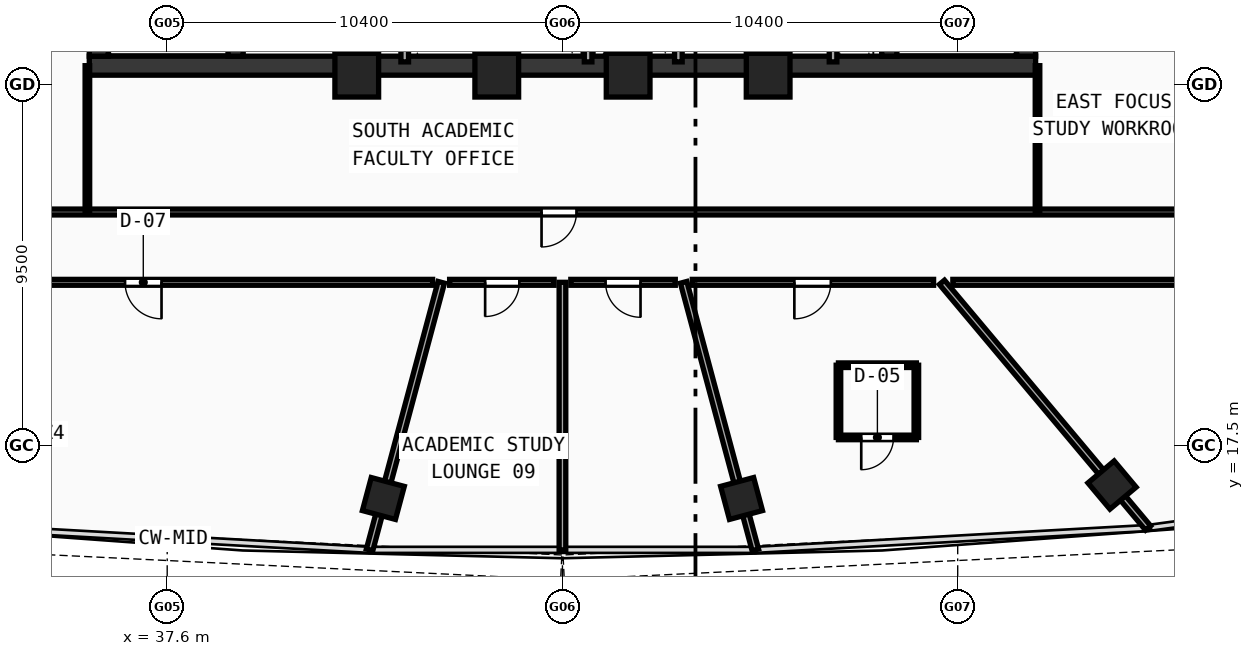
"""IFC4 building model, lengths in metres.
Left out: names, types, materials, properties, quantities, classifications, styles, units other than length and angle.
Written with IfcOpenShell. Run it as: python <this file> out.ifc"""

import sys

from ifc_helpers import new_model, si_unit, direction, frame, frame_2d, origin, origin_with_axes, origin_2d, place, context, subcontext, project, spatial, rectangle, hollow_rectangle, extrude, source, transform, mapped, element, fill, save


model = new_model("IFC4")
c1 = context("Model", 3, precision=1e-05, world=origin(), true_north=direction((0.0, 1.0)))
c2 = subcontext(c1, "Body", "Model", "MODEL_VIEW")
j1 = project(units=[si_unit("LENGTHUNIT", "METRE"), si_unit("PLANEANGLEUNIT", "RADIAN")], contexts=[c1])
p1 = place(None, origin())
s1 = spatial("IfcSite", under=j1, at=p1, CompositionType="ELEMENT")
p2 = place(p1, origin())
s2 = spatial("IfcBuilding", under=s1, at=p2, CompositionType="ELEMENT")
p3 = place(p2, frame((0.0, 0.0, 211.36)))
s3 = spatial("IfcBuildingStorey", under=s2, at=p3, CompositionType="ELEMENT", Elevation=211.36)
p4 = place(p3, frame((35.55, 27.5, 0.0), z_axis=(0.0, 0.0, 1.0), x_axis=(1.0, 0.0, 0.0)))
e1 = element("IfcWall", 1, at=p4, inside=s3, PredefinedType="SHEAR", context=c2, shape_type="SweptSolid", body=[
    extrude(rectangle(XDim=24.9, YDim=0.5, at=frame_2d((12.45, 0.0))), origin(), (0.0, 0.0, 1.0), 3.54),
])
for number, where, z_axis, x_axis in (
    (2, (35.8, 27.75, 0.0), (0.0, 0.0, 1.0), (0.0, 1.0, 0.0)),
    (3, (60.2, 27.75, 0.0), (0.0, 0.0, 1.0), (0.0, 1.0, 0.0)),
):
    element("IfcWall", number, at=place(p3, frame(where, z_axis=z_axis, x_axis=x_axis)), inside=s3, PredefinedType="SHEAR", context=c2, shape_type="SweptSolid", body=[
        extrude(rectangle(XDim=12.2, YDim=0.5, at=frame_2d((6.1, 0.0))), origin(), (0.0, 0.0, 1.0), 3.54),
    ])
p5 = place(p3, frame((39.4, 27.75, 0.0), z_axis=(0.0, 0.0, 1.0), x_axis=(0.0, 1.0, 0.0)))
e4 = element("IfcWall", 4, at=p5, inside=s3, PredefinedType="SHEAR", context=c2, shape_type="SweptSolid", body=[
    extrude(rectangle(XDim=12.2, YDim=0.4, at=frame_2d((6.1, 0.0))), origin(), (0.0, 0.0, 1.0), 3.54),
])
p6 = place(p5, frame((10.0, 0.0, 0.0)))
e5 = element("IfcOpeningElement", 5, at=p6, cuts=e4, PredefinedType="OPENING", context=c2, shape_type="SweptSolid", body=[
    extrude(rectangle(XDim=1.1, YDim=2.1, at=frame_2d((0.55, 1.05))), frame((0.0, 0.21, 0.0), z_axis=(0.0, -1.0, 0.0), x_axis=(1.0, 0.0, 0.0)), (0.0, 0.0, 1.0), 0.42),
])
p7 = place(p3, frame((56.6, 27.75, 0.0), z_axis=(0.0, 0.0, 1.0), x_axis=(0.0, 1.0, 0.0)))
e6 = element("IfcWall", 6, at=p7, inside=s3, PredefinedType="SHEAR", context=c2, shape_type="SweptSolid", body=[
    extrude(rectangle(XDim=12.2, YDim=0.4, at=frame_2d((6.1, 0.0))), origin(), (0.0, 0.0, 1.0), 3.54),
])
p8 = place(p7, frame((10.0, 0.0, 0.0)))
e7 = element("IfcOpeningElement", 7, at=p8, cuts=e6, PredefinedType="OPENING", context=c2, shape_type="SweptSolid", body=[
    extrude(rectangle(XDim=1.1, YDim=2.1, at=frame_2d((0.55, 1.05))), frame((0.0, 0.21, 0.0), z_axis=(0.0, -1.0, 0.0), x_axis=(1.0, 0.0, 0.0)), (0.0, 0.0, 1.0), 0.42),
])
m1 = source(origin(), c2, "Body", "SweptSolid", [
    extrude(hollow_rectangle(XDim=1.15, YDim=1.15, WallThickness=0.048, at=origin_2d()), origin(), (0.0, 0.0, 1.0), 3.8),
])
for number, where, z_axis, x_axis in (
    (8, (42.588, 27.25, -0.26), (0.0, 0.0, 1.0), (1.0, 0.0, 0.0)),
    (9, (46.272, 27.25, -0.26), (0.0, 0.0, 1.0), (1.0, 0.0, 0.0)),
    (10, (49.729, 27.25, -0.26), (0.0, 0.0, 1.0), (1.0, 0.0, 0.0)),
    (11, (53.412, 27.25, -0.26), (0.0, 0.0, 1.0), (1.0, 0.0, 0.0)),
):
    element("IfcColumn", number, at=place(p3, frame(where, z_axis=z_axis, x_axis=x_axis)), inside=s3, PredefinedType="COLUMN", context=c2, shape_type="MappedRepresentation", body=[
        mapped(m1, transform((0.0, 0.0, 0.0), scale=1.0)),
    ])
m2 = source(origin(), c2, "Body", "SweptSolid", [
    extrude(hollow_rectangle(XDim=0.9, YDim=0.9, WallThickness=0.036, at=origin_2d()), origin(), (0.0, 0.0, 1.0), 3.8),
])
for number, where, z_axis, x_axis in (
    (12, (43.288, 16.112, -0.26), (0.0, 0.0, 1.0), (0.966, -0.259, 0.0)),
    (13, (52.713, 16.112, -0.26), (0.0, 0.0, 1.0), (0.966, 0.259, 0.0)),
    (14, (62.461, 16.466, -0.26), (0.0, 0.0, 1.0), (0.766, 0.643, 0.0)),
):
    element("IfcColumn", number, at=place(p3, frame(where, z_axis=z_axis, x_axis=x_axis)), inside=s3, PredefinedType="COLUMN", context=c2, shape_type="MappedRepresentation", body=[
        mapped(m2, transform((0.0, 0.0, 0.0), scale=1.0)),
    ])
p9 = place(p3, frame((43.85, 27.6, 0.0), z_axis=(0.0, 0.0, 1.0), x_axis=(0.0, 1.0, 0.0)))
e15 = element("IfcWall", 15, at=p9, inside=s3, PredefinedType="SOLIDWALL", context=c2, shape_type="SweptSolid", body=[
    extrude(rectangle(XDim=6.22, YDim=0.2, at=frame_2d((3.11, 0.0))), origin(), (0.0, 0.0, 1.0), 3.54),
])
p10 = place(p9, frame((2.25, 0.0, 0.0)))
e16 = element("IfcOpeningElement", 16, at=p10, cuts=e15, PredefinedType="OPENING", context=c2, shape_type="SweptSolid", body=[
    extrude(rectangle(XDim=1.05, YDim=2.1, at=frame_2d((0.525, 1.05))), frame((0.0, 0.11, 0.0), z_axis=(0.0, -1.0, 0.0), x_axis=(1.0, 0.0, 0.0)), (0.0, 0.0, 1.0), 0.22),
])
p11 = place(p3, frame((53.68, 27.6, 0.0), z_axis=(0.0, 0.0, 1.0), x_axis=(0.0, 1.0, 0.0)))
e17 = element("IfcWall", 17, at=p11, inside=s3, PredefinedType="SOLIDWALL", context=c2, shape_type="SweptSolid", body=[
    extrude(rectangle(XDim=9.05, YDim=0.2, at=frame_2d((4.525, 0.0))), origin(), (0.0, 0.0, 1.0), 3.54),
])
p12 = place(p11, frame((6.9, 0.0, 0.0)))
e18 = element("IfcOpeningElement", 18, at=p12, cuts=e17, PredefinedType="OPENING", context=c2, shape_type="SweptSolid", body=[
    extrude(rectangle(XDim=1.05, YDim=2.1, at=frame_2d((0.525, 1.05))), frame((0.0, 0.11, 0.0), z_axis=(0.0, -1.0, 0.0), x_axis=(1.0, 0.0, 0.0)), (0.0, 0.0, 1.0), 0.22),
])
for number, where, z_axis, x_axis in (
    (19, (51.05, 27.6, 0.0), (0.0, 0.0, 1.0), (0.0, 1.0, 0.0)),
    (20, (46.225, 27.6, 0.0), (0.0, 0.0, 1.0), (0.0, 1.0, 0.0)),
    (21, (48.675, 27.6, 0.0), (0.0, 0.0, 1.0), (0.0, 1.0, 0.0)),
    (22, (55.12, 27.6, 0.0), (0.0, 0.0, 1.0), (0.0, 1.0, 0.0)),
):
    element("IfcWall", number, at=place(p3, frame(where, z_axis=z_axis, x_axis=x_axis)), inside=s3, PredefinedType="SOLIDWALL", context=c2, shape_type="SweptSolid", body=[
        extrude(rectangle(XDim=2.12, YDim=0.2, at=frame_2d((1.06, 0.0))), origin(), (0.0, 0.0, 1.0), 3.54),
    ])
p13 = place(p3, frame((42.32, 27.6, 0.0), z_axis=(0.0, 0.0, 1.0), x_axis=(0.0, 1.0, 0.0)))
e23 = element("IfcWall", 23, at=p13, inside=s3, PredefinedType="PARTITIONING", context=c2, shape_type="SweptSolid", body=[
    extrude(rectangle(XDim=5.9, YDim=0.155, at=frame_2d((2.95, 0.0))), origin(), (0.0, 0.0, 1.0), 3.54),
])
p14 = place(p13, frame((3.2, 0.0, 0.0)))
e24 = element("IfcOpeningElement", 24, at=p14, cuts=e23, PredefinedType="OPENING", context=c2, shape_type="SweptSolid", body=[
    extrude(rectangle(XDim=0.94, YDim=2.1, at=frame_2d((0.47, 1.05))), frame((0.0, 0.087, 0.0), z_axis=(0.0, -1.0, 0.0), x_axis=(1.0, 0.0, 0.0)), (0.0, 0.0, 1.0), 0.175),
])
p15 = place(p3, frame((31.45, 23.65, 0.0), z_axis=(0.0, 0.0, 1.0), x_axis=(1.0, 0.0, 0.0)))
e25 = element("IfcWall", 25, at=p15, inside=s3, PredefinedType="PARTITIONING", context=c2, shape_type="SweptSolid", body=[
    extrude(rectangle(XDim=33.1, YDim=0.155, at=frame_2d((16.55, 0.0))), origin(), (0.0, 0.0, 1.0), 2.89),
])
p16 = place(p15, frame((16.0, 0.0, 0.0)))
e26 = element("IfcOpeningElement", 26, at=p16, cuts=e25, PredefinedType="OPENING", context=c2, shape_type="SweptSolid", body=[
    extrude(rectangle(XDim=0.92, YDim=2.1, at=frame_2d((0.46, 1.05))), frame((0.0, 0.087, 0.0), z_axis=(0.0, -1.0, 0.0), x_axis=(1.0, 0.0, 0.0)), (0.0, 0.0, 1.0), 0.175),
])
for number, where, z_axis, x_axis in (
    (27, (35.5, 23.65, 0.0), (0.0, 0.0, 1.0), (0.0, 1.0, 0.0)),
    (28, (60.5, 23.65, 0.0), (0.0, 0.0, 1.0), (0.0, 1.0, 0.0)),
):
    element("IfcWall", number, at=place(p3, frame(where, z_axis=z_axis, x_axis=x_axis)), inside=s3, PredefinedType="PARTITIONING", context=c2, shape_type="SweptSolid", body=[
        extrude(rectangle(XDim=3.85, YDim=0.12, at=frame_2d((1.925, 0.0))), origin(), (0.0, 0.0, 1.0), 3.14),
    ])
p17 = place(p3, frame((44.811, 21.8, 0.0), z_axis=(0.0, 0.0, 1.0), x_axis=(-0.258817575638, -0.96592622003, 0.0)))
e29 = element("IfcWall", 29, at=p17, inside=s3, PredefinedType="PARTITIONING", context=c2, shape_type="SweptSolid", body=[
    extrude(rectangle(XDim=7.288, YDim=0.175, at=frame_2d((3.644, 0.0))), origin(), (0.0, 0.0, 1.0), 2.89),
])
p18 = place(p3, frame((48.0, 21.8, 0.0), z_axis=(0.0, 0.0, 1.0), x_axis=(0.0, -1.0, 0.0)))
e30 = element("IfcWall", 30, at=p18, inside=s3, PredefinedType="PARTITIONING", context=c2, shape_type="SweptSolid", body=[
    extrude(rectangle(XDim=7.04, YDim=0.175, at=frame_2d((3.52, 0.0))), origin(), (0.0, 0.0, 1.0), 2.89),
])
p19 = place(p3, frame((51.189, 21.8, 0.0), z_axis=(0.0, 0.0, 1.0), x_axis=(0.258817575638, -0.96592622003, 0.0)))
e31 = element("IfcWall", 31, at=p19, inside=s3, PredefinedType="PARTITIONING", context=c2, shape_type="SweptSolid", body=[
    extrude(rectangle(XDim=7.288, YDim=0.175, at=frame_2d((3.644, 0.0))), origin(), (0.0, 0.0, 1.0), 2.89),
])
p20 = place(p3, frame((57.985, 21.8, 0.0), z_axis=(0.0, 0.0, 1.0), x_axis=(0.642770599155, -0.766058716328, 0.0)))
e32 = element("IfcWall", 32, at=p20, inside=s3, PredefinedType="PARTITIONING", context=c2, shape_type="SweptSolid", body=[
    extrude(rectangle(XDim=8.438, YDim=0.175, at=frame_2d((4.219, 0.0))), origin(), (0.0, 0.0, 1.0), 2.89),
])
p21 = place(p3, frame((66.4, 21.8, 0.0), z_axis=(0.0, 0.0, 1.0), x_axis=(-1.0, 0.0, 0.0)))
e33 = element("IfcWall", 33, at=p21, inside=s3, PredefinedType="PARTITIONING", context=c2, shape_type="SweptSolid", body=[
    extrude(rectangle(XDim=8.127, YDim=0.155, at=frame_2d((4.064, 0.0))), origin(), (0.0, 0.0, 1.0), 3.14),
])
p22 = place(p3, frame((57.765, 21.8, 0.0), z_axis=(0.0, 0.0, 1.0), x_axis=(-1.0, 0.0, 0.0)))
e34 = element("IfcWall", 34, at=p22, inside=s3, PredefinedType="PARTITIONING", context=c2, shape_type="SweptSolid", body=[
    extrude(rectangle(XDim=6.349, YDim=0.155, at=frame_2d((3.174, 0.0))), origin(), (0.0, 0.0, 1.0), 2.89),
])
p23 = place(p22, frame((2.703, 0.0, 0.0)))
e35 = element("IfcOpeningElement", 35, at=p23, cuts=e34, PredefinedType="OPENING", context=c2, shape_type="SweptSolid", body=[
    extrude(rectangle(XDim=0.96, YDim=2.12, at=frame_2d((0.48, 1.06))), frame((0.0, 0.087, 0.0), z_axis=(0.0, -1.0, 0.0), x_axis=(1.0, 0.0, 0.0)), (0.0, 0.0, 1.0), 0.175),
])
p24 = place(p3, frame((50.969, 21.8, 0.0), z_axis=(0.0, 0.0, 1.0), x_axis=(-1.0, 0.0, 0.0)))
e36 = element("IfcWall", 36, at=p24, inside=s3, PredefinedType="PARTITIONING", context=c2, shape_type="SweptSolid", body=[
    extrude(rectangle(XDim=2.749, YDim=0.155, at=frame_2d((1.375, 0.0))), origin(), (0.0, 0.0, 1.0), 3.54),
])
p25 = place(p24, frame((0.915, 0.0, 0.0)))
e37 = element("IfcOpeningElement", 37, at=p25, cuts=e36, PredefinedType="OPENING", context=c2, shape_type="SweptSolid", body=[
    extrude(rectangle(XDim=0.92, YDim=2.1, at=frame_2d((0.46, 1.05))), frame((0.0, 0.087, 0.0), z_axis=(0.0, -1.0, 0.0), x_axis=(1.0, 0.0, 0.0)), (0.0, 0.0, 1.0), 0.175),
])
p26 = place(p3, frame((47.78, 21.8, 0.0), z_axis=(0.0, 0.0, 1.0), x_axis=(-1.0, 0.0, 0.0)))
e38 = element("IfcWall", 38, at=p26, inside=s3, PredefinedType="PARTITIONING", context=c2, shape_type="SweptSolid", body=[
    extrude(rectangle(XDim=2.749, YDim=0.155, at=frame_2d((1.375, 0.0))), origin(), (0.0, 0.0, 1.0), 3.54),
])
p27 = place(p26, frame((0.914, 0.0, 0.0)))
e39 = element("IfcOpeningElement", 39, at=p27, cuts=e38, PredefinedType="OPENING", context=c2, shape_type="SweptSolid", body=[
    extrude(rectangle(XDim=0.9, YDim=2.08, at=frame_2d((0.45, 1.04))), frame((0.0, 0.087, 0.0), z_axis=(0.0, -1.0, 0.0), x_axis=(1.0, 0.0, 0.0)), (0.0, 0.0, 1.0), 0.175),
])
p28 = place(p3, frame((44.583, 21.8, 0.0), z_axis=(0.0, 0.0, 1.0), x_axis=(-1.0, 0.0, 0.0)))
e40 = element("IfcWall", 40, at=p28, inside=s3, PredefinedType="PARTITIONING", context=c2, shape_type="SweptSolid", body=[
    extrude(rectangle(XDim=14.983, YDim=0.155, at=frame_2d((7.492, 0.0))), origin(), (0.0, 0.0, 1.0), 2.89),
])
p29 = place(p28, frame((7.133, 0.0, 0.0)))
e41 = element("IfcOpeningElement", 41, at=p29, cuts=e40, PredefinedType="OPENING", context=c2, shape_type="SweptSolid", body=[
    extrude(rectangle(XDim=0.96, YDim=2.12, at=frame_2d((0.48, 1.06))), frame((0.0, 0.087, 0.0), z_axis=(0.0, -1.0, 0.0), x_axis=(1.0, 0.0, 0.0)), (0.0, 0.0, 1.0), 0.175),
])
p30 = place(p3, frame((55.262, 17.719, 0.0), z_axis=(0.0, 0.0, 1.0), x_axis=(1.0, 0.0, 0.0)))
e42 = element("IfcWall", 42, at=p30, inside=s3, PredefinedType="PARTITIONING", context=c2, shape_type="SweptSolid", body=[
    extrude(rectangle(XDim=2.05, YDim=0.12, at=frame_2d((1.025, 0.0))), origin(), (0.0, 0.0, 1.0), 3.54),
])
p31 = place(p30, frame((0.6, 0.0, 0.0)))
e43 = element("IfcOpeningElement", 43, at=p31, cuts=e42, PredefinedType="OPENING", context=c2, shape_type="SweptSolid", body=[
    extrude(rectangle(XDim=0.85, YDim=2.1, at=frame_2d((0.425, 1.05))), frame((0.0, 0.07, 0.0), z_axis=(0.0, -1.0, 0.0), x_axis=(1.0, 0.0, 0.0)), (0.0, 0.0, 1.0), 0.14),
])
p32 = place(p3, frame((57.312, 17.719, 0.0), z_axis=(0.0, 0.0, 1.0), x_axis=(0.0, 1.0, 0.0)))
e44 = element("IfcWall", 44, at=p32, inside=s3, PredefinedType="PARTITIONING", context=c2, shape_type="SweptSolid", body=[
    extrude(rectangle(XDim=1.9, YDim=0.12, at=frame_2d((0.95, 0.0))), origin(), (0.0, 0.0, 1.0), 3.54),
])
p33 = place(p3, frame((57.312, 19.619, 0.0), z_axis=(0.0, 0.0, 1.0), x_axis=(-1.0, 0.0, 0.0)))
e45 = element("IfcWall", 45, at=p33, inside=s3, PredefinedType="PARTITIONING", context=c2, shape_type="SweptSolid", body=[
    extrude(rectangle(XDim=2.05, YDim=0.12, at=frame_2d((1.025, 0.0))), origin(), (0.0, 0.0, 1.0), 3.54),
])
p34 = place(p3, frame((55.262, 19.619, 0.0), z_axis=(0.0, 0.0, 1.0), x_axis=(0.0, -1.0, 0.0)))
e46 = element("IfcWall", 46, at=p34, inside=s3, PredefinedType="PARTITIONING", context=c2, shape_type="SweptSolid", body=[
    extrude(rectangle(XDim=1.9, YDim=0.12, at=frame_2d((0.95, 0.0))), origin(), (0.0, 0.0, 1.0), 3.54),
])
m3 = source(origin(), c2, "Body", "SweptSolid", [
    extrude(rectangle(XDim=0.92, YDim=2.1, at=frame_2d((0.46, 1.05))), frame((0.0, 0.025, 0.0), z_axis=(0.0, -1.0, 0.0), x_axis=(1.0, 0.0, 0.0)), (0.0, 0.0, 1.0), 0.05),
])
p35 = place(p16, frame((0.92, 0.0, 0.0), z_axis=(0.0, 0.0, 1.0), x_axis=(-1.0, 0.0, 0.0)))
e47 = element("IfcDoor", 47, at=p35, inside=s3, OperationType="SINGLE_SWING_RIGHT", PredefinedType="DOOR", context=c2, shape_type="MappedRepresentation", body=[
    mapped(m3, transform((0.0, 0.0, 0.0), scale=1.0)),
])
fill(e26, e47)
m4 = source(origin(), c2, "Body", "SweptSolid", [
    extrude(rectangle(XDim=0.96, YDim=2.12, at=frame_2d((0.48, 1.06))), frame((0.0, 0.025, 0.0), z_axis=(0.0, -1.0, 0.0), x_axis=(1.0, 0.0, 0.0)), (0.0, 0.0, 1.0), 0.05),
])
p36 = place(p29, origin_with_axes())
e48 = element("IfcDoor", 48, at=p36, inside=s3, OperationType="SINGLE_SWING_LEFT", PredefinedType="DOOR", context=c2, shape_type="MappedRepresentation", body=[
    mapped(m4, transform((0.0, 0.0, 0.0), scale=1.0)),
])
fill(e41, e48)
m5 = source(origin(), c2, "Body", "SweptSolid", [
    extrude(rectangle(XDim=0.9, YDim=2.08, at=frame_2d((0.45, 1.04))), frame((0.0, 0.025, 0.0), z_axis=(0.0, -1.0, 0.0), x_axis=(1.0, 0.0, 0.0)), (0.0, 0.0, 1.0), 0.05),
])
p37 = place(p27, origin_with_axes())
e49 = element("IfcDoor", 49, at=p37, inside=s3, OperationType="SINGLE_SWING_RIGHT", PredefinedType="DOOR", context=c2, shape_type="MappedRepresentation", body=[
    mapped(m5, transform((0.0, 0.0, 0.0), scale=1.0)),
])
fill(e39, e49)
p38 = place(p25, origin_with_axes())
e50 = element("IfcDoor", 50, at=p38, inside=s3, OperationType="SINGLE_SWING_LEFT", PredefinedType="DOOR", context=c2, shape_type="MappedRepresentation", body=[
    mapped(m3, transform((0.0, 0.0, 0.0), scale=1.0)),
])
fill(e37, e50)
p39 = place(p23, origin_with_axes())
e51 = element("IfcDoor", 51, at=p39, inside=s3, OperationType="SINGLE_SWING_RIGHT", PredefinedType="DOOR", context=c2, shape_type="MappedRepresentation", body=[
    mapped(m4, transform((0.0, 0.0, 0.0), scale=1.0)),
])
fill(e35, e51)
m6 = source(origin(), c2, "Body", "SweptSolid", [
    extrude(rectangle(XDim=0.85, YDim=2.1, at=frame_2d((0.425, 1.05))), frame((0.0, 0.025, 0.0), z_axis=(0.0, -1.0, 0.0), x_axis=(1.0, 0.0, 0.0)), (0.0, 0.0, 1.0), 0.05),
])
p40 = place(p31, frame((0.85, 0.0, 0.0), z_axis=(0.0, 0.0, 1.0), x_axis=(-1.0, 0.0, 0.0)))
e52 = element("IfcDoor", 52, at=p40, inside=s3, OperationType="SINGLE_SWING_RIGHT", PredefinedType="DOOR", context=c2, shape_type="MappedRepresentation", body=[
    mapped(m6, transform((0.0, 0.0, 0.0), scale=1.0)),
])
fill(e43, e52)
save(model, sys.argv[1])
